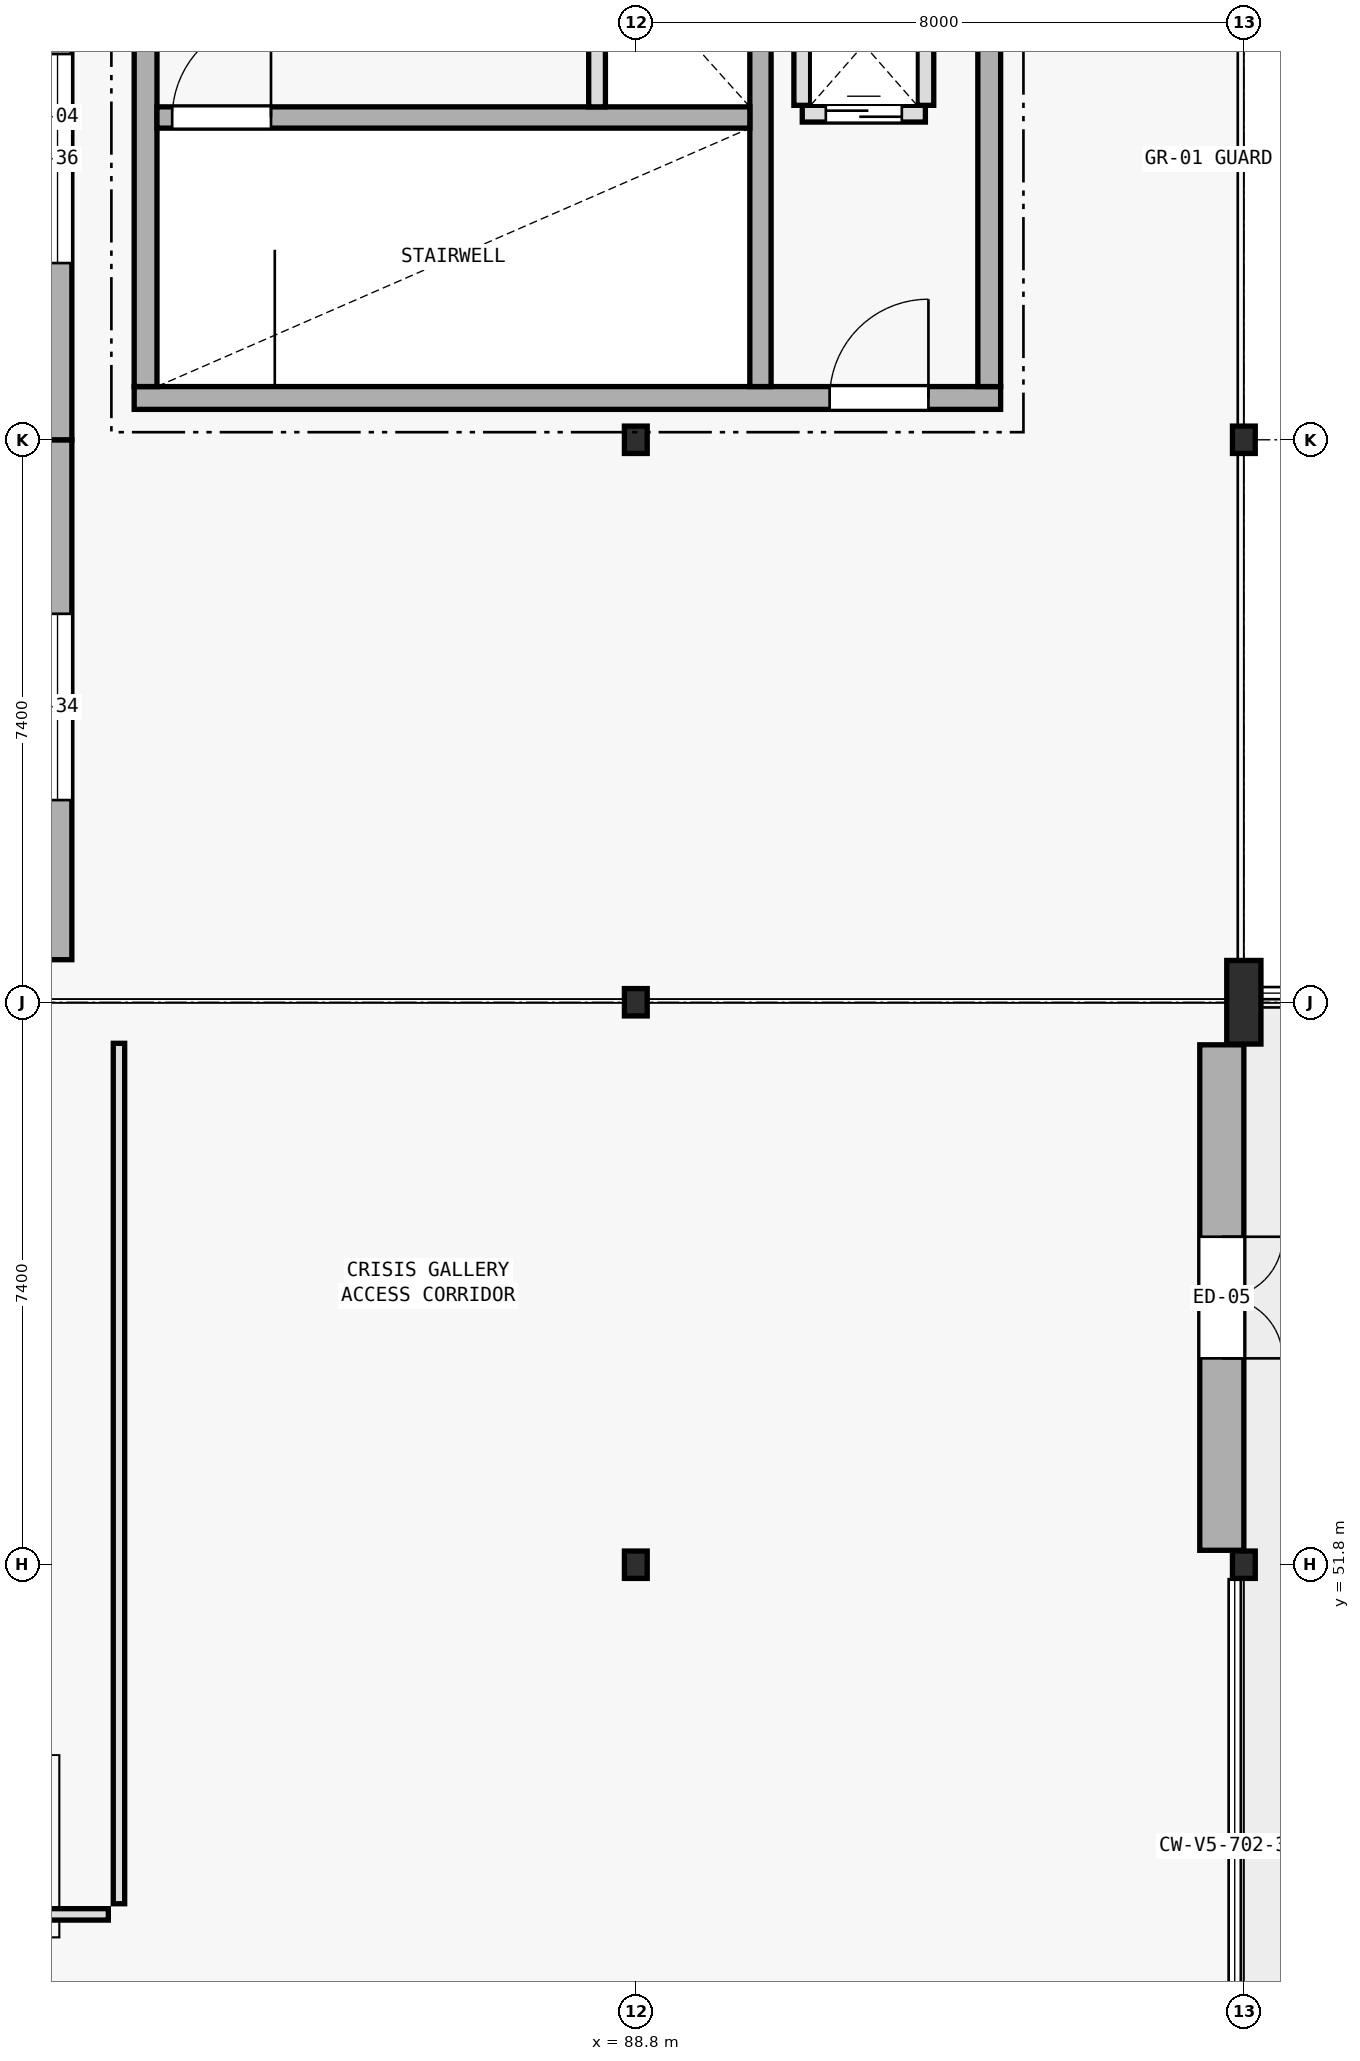
"""IFC4 building model, lengths in metres.
Left out: names, types, materials, properties, quantities, classifications, styles, units other than length and angle.
Written with IfcOpenShell. Run it as: python <this file> out.ifc"""

import sys

from ifc_helpers import new_model, si_unit, direction, frame, frame_2d, origin, origin_2d, place, context, subcontext, project, spatial, rectangle, i_section, extrude, element, fill, save


model = new_model("IFC4")
c1 = context("Model", 3, precision=1e-05, world=origin(), true_north=direction((0.0, 1.0)))
c2 = subcontext(c1, "Body", "Model", "MODEL_VIEW")
j1 = project(units=[si_unit("LENGTHUNIT", "METRE"), si_unit("PLANEANGLEUNIT", "RADIAN")], contexts=[c1])
p1 = place(None, origin())
s1 = spatial("IfcSite", under=j1, at=p1, CompositionType="ELEMENT")
p2 = place(p1, origin())
s2 = spatial("IfcBuilding", under=s1, at=p2, CompositionType="ELEMENT")
p3 = place(p2, frame((0.0, 0.0, 23.3)))
s3 = spatial("IfcBuildingStorey", under=s2, at=p3, CompositionType="ELEMENT", Elevation=23.3)
p4 = place(p3, frame((82.2, 67.15, 0.0), z_axis=(0.0, 0.0, 1.0), x_axis=(1.0, 0.0, 0.0)))
e1 = element("IfcWall", 1, at=p4, inside=s3, PredefinedType="SHEAR", context=c2, shape_type="SweptSolid", body=[
    extrude(rectangle(XDim=11.4, YDim=0.3, at=frame_2d((5.7, 0.0))), origin(), (0.0, 0.0, 1.0), 3.895),
])
p5 = place(p4, frame((9.15, 0.0, 0.0)))
e2 = element("IfcOpeningElement", 2, at=p5, cuts=e1, PredefinedType="OPENING", context=c2, shape_type="SweptSolid", body=[
    extrude(rectangle(XDim=1.3, YDim=2.2, at=frame_2d((0.65, 1.1))), frame((0.0, 0.16, 0.0), z_axis=(0.0, -1.0, 0.0), x_axis=(1.0, 0.0, 0.0)), (0.0, 0.0, 1.0), 0.32),
])
for number, where, z_axis, x_axis in (
    (3, (82.35, 67.3, 0.0), (0.0, 0.0, 1.0), (0.0, 1.0, 0.0)),
    (4, (93.45, 67.3, 0.0), (0.0, 0.0, 1.0), (0.0, 1.0, 0.0)),
):
    element("IfcWall", number, at=place(p3, frame(where, z_axis=z_axis, x_axis=x_axis)), inside=s3, PredefinedType="SHEAR", context=c2, shape_type="SweptSolid", body=[
        extrude(rectangle(XDim=5.8, YDim=0.3, at=frame_2d((2.9, 0.0))), origin(), (0.0, 0.0, 1.0), 3.895),
    ])
p6 = place(p3, frame((90.44, 67.3, 0.0), z_axis=(0.0, 0.0, 1.0), x_axis=(0.0, 1.0, 0.0)))
e5 = element("IfcWall", 5, at=p6, inside=s3, PredefinedType="SHEAR", context=c2, shape_type="SweptSolid", body=[
    extrude(rectangle(XDim=5.8, YDim=0.28, at=frame_2d((2.9, 0.0))), origin(), (0.0, 0.0, 1.0), 3.895),
])
p7 = place(p3, frame((82.5, 70.84, 0.0), z_axis=(0.0, 0.0, 1.0), x_axis=(1.0, 0.0, 0.0)))
e6 = element("IfcWall", 6, at=p7, inside=s3, PredefinedType="SHEAR", context=c2, shape_type="SweptSolid", body=[
    extrude(rectangle(XDim=7.8, YDim=0.28, at=frame_2d((3.9, 0.0))), origin(), (0.0, 0.0, 1.0), 3.895),
])
p8 = place(p7, frame((0.2, 0.0, 0.0)))
e7 = element("IfcOpeningElement", 7, at=p8, cuts=e6, PredefinedType="OPENING", context=c2, shape_type="SweptSolid", body=[
    extrude(rectangle(XDim=1.3, YDim=2.2, at=frame_2d((0.65, 1.1))), frame((0.0, 0.15, 0.0), z_axis=(0.0, -1.0, 0.0), x_axis=(1.0, 0.0, 0.0)), (0.0, 0.0, 1.0), 0.3),
])
for number, where, z_axis, x_axis in (
    (8, (88.8, 51.8, 0.0), (0.0, 0.0, 1.0), (1.0, 0.0, 0.0)),
    (9, (88.8, 59.2, 0.0), (0.0, 0.0, 1.0), (1.0, 0.0, 0.0)),
    (10, (88.8, 66.6, 0.0), (0.0, 0.0, 1.0), (1.0, 0.0, 0.0)),
    (11, (96.8, 51.8, 0.0), (0.0, 0.0, 1.0), (1.0, 0.0, 0.0)),
):
    element("IfcColumn", number, at=place(p3, frame(where, z_axis=z_axis, x_axis=x_axis)), inside=s3, PredefinedType="COLUMN", context=c2, shape_type="SweptSolid", body=[
        extrude(i_section(OverallWidth=0.3, OverallDepth=0.36, WebThickness=0.012, FlangeThickness=0.022, FilletRadius=0.027, at=origin_2d()), origin(), (0.0, 0.0, 1.0), 3.9),
    ])
p9 = place(p3, frame((96.8, 59.2, 0.0), z_axis=(0.0, 0.0, 1.0), x_axis=(1.0, 0.0, 0.0)))
e12 = element("IfcColumn", 12, at=p9, inside=s3, PredefinedType="PILASTER", context=c2, shape_type="SweptSolid", body=[
    extrude(rectangle(XDim=0.45, YDim=1.1, at=origin_2d()), origin(), (0.0, 0.0, 1.0), 3.9),
])
p10 = place(p3, frame((96.8, 66.6, 0.0), z_axis=(0.0, 0.0, 1.0), x_axis=(1.0, 0.0, 0.0)))
e13 = element("IfcColumn", 13, at=p10, inside=s3, PredefinedType="COLUMN", context=c2, shape_type="SweptSolid", body=[
    extrude(i_section(OverallWidth=0.3, OverallDepth=0.36, WebThickness=0.012, FlangeThickness=0.022, FilletRadius=0.027, at=origin_2d()), origin(), (0.0, 0.0, 1.0), 3.9),
])
p11 = place(p3, frame((81.09, 59.76, 0.0), z_axis=(0.0, 0.0, 1.0), x_axis=(0.0, 1.0, 0.0)))
e14 = element("IfcWall", 14, at=p11, inside=s3, PredefinedType="STANDARD", context=c2, shape_type="SweptSolid", body=[
    extrude(rectangle(XDim=6.84, YDim=0.58, at=frame_2d((3.42, 0.0))), origin(), (0.0, 0.0, 1.0), 3.9),
])
p12 = place(p11, frame((2.1, 0.0, 0.9)))
e15 = element("IfcOpeningElement", 15, at=p12, cuts=e14, PredefinedType="OPENING", context=c2, shape_type="SweptSolid", body=[
    extrude(rectangle(XDim=2.45, YDim=2.2, at=frame_2d((1.225, 1.1))), frame((0.0, 0.3, 0.0), z_axis=(0.0, -1.0, 0.0), x_axis=(1.0, 0.0, 0.0)), (0.0, 0.0, 1.0), 0.6),
])
p13 = place(p3, frame((81.09, 66.6, 0.0), z_axis=(0.0, 0.0, 1.0), x_axis=(0.0, 1.0, 0.0)))
e16 = element("IfcWall", 16, at=p13, inside=s3, PredefinedType="STANDARD", context=c2, shape_type="SweptSolid", body=[
    extrude(rectangle(XDim=7.4, YDim=0.58, at=frame_2d((3.7, 0.0))), origin(), (0.0, 0.0, 1.0), 3.9),
])
p14 = place(p13, frame((2.325, 0.0, 0.9)))
e17 = element("IfcOpeningElement", 17, at=p14, cuts=e16, PredefinedType="OPENING", context=c2, shape_type="SweptSolid", body=[
    extrude(rectangle(XDim=2.75, YDim=1.8, at=frame_2d((1.375, 0.9))), frame((0.0, 0.3, 0.0), z_axis=(0.0, -1.0, 0.0), x_axis=(1.0, 0.0, 0.0)), (0.0, 0.0, 1.0), 0.6),
])
p15 = place(p3, frame((96.51, 58.64, 0.0), z_axis=(0.0, 0.0, 1.0), x_axis=(0.0, -1.0, 0.0)))
e18 = element("IfcWall", 18, at=p15, inside=s3, PredefinedType="STANDARD", context=c2, shape_type="SweptSolid", body=[
    extrude(rectangle(XDim=6.65, YDim=0.58, at=frame_2d((3.325, 0.0))), origin(), (0.0, 0.0, 1.0), 3.57),
])
p16 = place(p15, frame((2.525, 0.0, 0.0)))
e19 = element("IfcOpeningElement", 19, at=p16, cuts=e18, PredefinedType="OPENING", context=c2, shape_type="SweptSolid", body=[
    extrude(rectangle(XDim=1.6, YDim=2.3, at=frame_2d((0.8, 1.15))), frame((0.0, 0.3, 0.0), z_axis=(0.0, -1.0, 0.0), x_axis=(1.0, 0.0, 0.0)), (0.0, 0.0, 1.0), 0.6),
])
p17 = place(p3, frame((90.99, 70.89, 0.0), z_axis=(0.0, 0.0, 1.0), x_axis=(1.0, 0.0, 0.0)))
e20 = element("IfcWall", 20, at=p17, inside=s3, PredefinedType="PLUMBINGWALL", context=c2, shape_type="SweptSolid", body=[
    extrude(rectangle(XDim=1.62, YDim=0.22, at=frame_2d((0.81, 0.0))), origin(), (0.0, 0.0, 1.0), 3.68),
])
p18 = place(p17, frame((0.31, 0.0, 0.0)))
e21 = element("IfcOpeningElement", 21, at=p18, cuts=e20, PredefinedType="OPENING", context=c2, shape_type="SweptSolid", body=[
    extrude(rectangle(XDim=1.0, YDim=2.2, at=frame_2d((0.5, 1.1))), frame((0.0, 0.12, 0.0), z_axis=(0.0, -1.0, 0.0), x_axis=(1.0, 0.0, 0.0)), (0.0, 0.0, 1.0), 0.24),
])
for number, where, z_axis, x_axis in (
    (22, (90.99, 71.0, 0.0), (0.0, 0.0, 1.0), (0.0, 1.0, 0.0)),
    (23, (92.61, 71.0, 0.0), (0.0, 0.0, 1.0), (0.0, 1.0, 0.0)),
):
    element("IfcWall", number, at=place(p3, frame(where, z_axis=z_axis, x_axis=x_axis)), inside=s3, PredefinedType="PLUMBINGWALL", context=c2, shape_type="SweptSolid", body=[
        extrude(rectangle(XDim=1.6, YDim=0.22, at=frame_2d((0.8, 0.0))), origin(), (0.0, 0.0, 1.0), 3.68),
    ])
p19 = place(p3, frame((88.29, 70.98, 0.0), z_axis=(0.0, 0.0, 1.0), x_axis=(0.0, 1.0, 0.0)))
e24 = element("IfcWall", 24, at=p19, inside=s3, PredefinedType="PLUMBINGWALL", context=c2, shape_type="SweptSolid", body=[
    extrude(rectangle(XDim=2.12, YDim=0.22, at=frame_2d((1.06, 0.0))), origin(), (0.0, 0.0, 1.0), 3.68),
])
p20 = place(p3, frame((54.14, 47.2, 0.0), z_axis=(0.0, 0.0, 1.0), x_axis=(1.0, 0.0, 0.0)))
e25 = element("IfcWall", 25, at=p20, inside=s3, PredefinedType="PARTITIONING", context=c2, shape_type="SweptSolid", body=[
    extrude(rectangle(XDim=27.72, YDim=0.15, at=frame_2d((13.86, 0.0))), origin(), (0.0, 0.0, 1.0), 3.1),
])
p21 = place(p20, frame((13.31, 0.0, 0.0)))
e26 = element("IfcOpeningElement", 26, at=p21, cuts=e25, PredefinedType="OPENING", context=c2, shape_type="SweptSolid", body=[
    extrude(rectangle(XDim=1.1, YDim=2.2, at=frame_2d((0.55, 1.1))), frame((0.0, 0.085, 0.0), z_axis=(0.0, -1.0, 0.0), x_axis=(1.0, 0.0, 0.0)), (0.0, 0.0, 1.0), 0.17),
])
p22 = place(p3, frame((82.0, 47.34, 0.0), z_axis=(0.0, 0.0, 1.0), x_axis=(0.0, 1.0, 0.0)))
e27 = element("IfcWall", 27, at=p22, inside=s3, PredefinedType="PARTITIONING", context=c2, shape_type="SweptSolid", body=[
    extrude(rectangle(XDim=11.32, YDim=0.15, at=frame_2d((5.66, 0.0))), origin(), (0.0, 0.0, 1.0), 3.1),
])
p23 = place(p16, origin())
e28 = element("IfcDoor", 28, at=p23, inside=s3, OperationType="DOUBLE_DOOR_SINGLE_SWING", PredefinedType="DOOR", context=c2, shape_type="SweptSolid", body=[
    extrude(rectangle(XDim=1.6, YDim=2.3, at=frame_2d((0.8, 1.15))), frame((0.0, 0.025, 0.0), z_axis=(0.0, -1.0, 0.0), x_axis=(1.0, 0.0, 0.0)), (0.0, 0.0, 1.0), 0.05),
])
fill(e19, e28)
p24 = place(p8, origin())
e29 = element("IfcDoor", 29, at=p24, inside=s3, OperationType="SINGLE_SWING_RIGHT", PredefinedType="DOOR", context=c2, shape_type="SweptSolid", body=[
    extrude(rectangle(XDim=1.3, YDim=2.2, at=frame_2d((0.65, 1.1))), frame((0.0, 0.025, 0.0), z_axis=(0.0, -1.0, 0.0), x_axis=(1.0, 0.0, 0.0)), (0.0, 0.0, 1.0), 0.05),
])
fill(e7, e29)
p25 = place(p18, origin())
e30 = element("IfcDoor", 30, at=p25, inside=s3, OperationType="DOUBLE_DOOR_SLIDING", PredefinedType="DOOR", context=c2, shape_type="SweptSolid", body=[
    extrude(rectangle(XDim=1.0, YDim=2.2, at=frame_2d((0.5, 1.1))), frame((0.0, 0.025, 0.0), z_axis=(0.0, -1.0, 0.0), x_axis=(1.0, 0.0, 0.0)), (0.0, 0.0, 1.0), 0.05),
])
fill(e21, e30)
p26 = place(p5, origin())
e31 = element("IfcDoor", 31, at=p26, inside=s3, OperationType="SINGLE_SWING_RIGHT", PredefinedType="DOOR", context=c2, shape_type="SweptSolid", body=[
    extrude(rectangle(XDim=1.3, YDim=2.2, at=frame_2d((0.65, 1.1))), frame((0.0, 0.025, 0.0), z_axis=(0.0, -1.0, 0.0), x_axis=(1.0, 0.0, 0.0)), (0.0, 0.0, 1.0), 0.05),
])
fill(e2, e31)
save(model, sys.argv[1])
